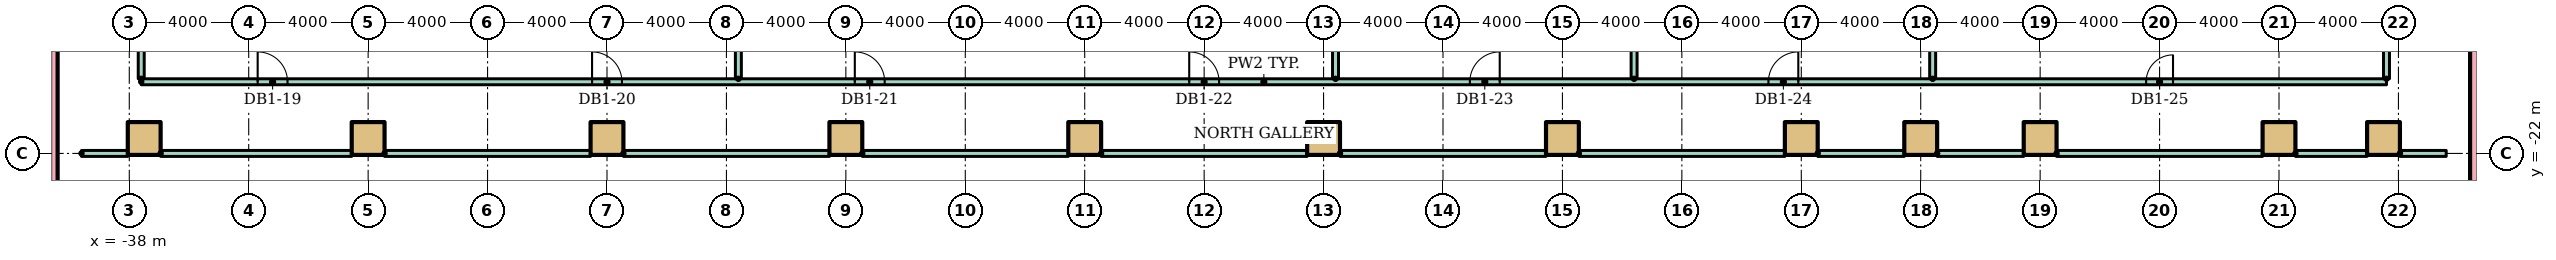
"""IFC4 building model, lengths in metres.
Left out: names, types, materials, properties, quantities, classifications, styles, units other than length and angle.
Written with IfcOpenShell. Run it as: python <this file> out.ifc"""

import sys

from ifc_helpers import new_model, si_unit, direction, frame, frame_2d, origin, origin_2d, place, context, subcontext, project, spatial, rectangle, extrude, element, fill, save


model = new_model("IFC4")
c1 = context("Model", 3, precision=1e-05, world=origin(), true_north=direction((0.0, 1.0)))
c2 = subcontext(c1, "Body", "Model", "MODEL_VIEW")
j1 = project(units=[si_unit("LENGTHUNIT", "METRE"), si_unit("PLANEANGLEUNIT", "RADIAN")], contexts=[c1])
p1 = place(None, origin())
s1 = spatial("IfcSite", under=j1, at=p1, CompositionType="ELEMENT")
p2 = place(p1, origin())
s2 = spatial("IfcBuilding", under=s1, at=p2, CompositionType="ELEMENT")
p3 = place(p2, frame((0.0, 0.0, -5.0)))
s3 = spatial("IfcBuildingStorey", under=s2, at=p3, CompositionType="ELEMENT", Elevation=-5.0)
for number, where, z_axis, x_axis in (
    (1, (-40.7, -50.4, -0.35), (0.0, 0.0, 1.0), (0.0, 1.0, 0.0)),
    (2, (40.7, -50.4, -0.35), (0.0, 0.0, 1.0), (0.0, 1.0, 0.0)),
):
    element("IfcWall", number, at=place(p3, frame(where, z_axis=z_axis, x_axis=x_axis)), inside=s3, PredefinedType="SOLIDWALL", context=c2, shape_type="SweptSolid", body=[
        extrude(rectangle(XDim=70.8, YDim=0.6, at=frame_2d((35.4, 0.0))), origin(), (0.0, 0.0, 1.0), 4.93),
    ])
for number, where in (
    (3, (-37.5, -21.5, 0.0)),
    (4, (-30.0, -21.5, 0.0)),
    (5, (-22.0, -21.5, 0.0)),
    (6, (-14.0, -21.5, 0.0)),
    (7, (-6.0, -21.5, 0.0)),
    (8, (2.0, -21.5, 0.0)),
    (9, (10.0, -21.5, 0.0)),
    (10, (18.0, -21.5, 0.0)),
    (11, (22.0, -21.5, 0.0)),
    (12, (26.0, -21.5, 0.0)),
    (13, (34.0, -21.5, 0.0)),
    (14, (37.5, -21.5, 0.0)),
):
    element("IfcColumn", number, at=place(p3, frame(where)), inside=s3, PredefinedType="COLUMN", context=c2, shape_type="SweptSolid", body=[
        extrude(rectangle(XDim=1.1, YDim=1.1, at=origin_2d()), origin(), (0.0, 0.0, 1.0), 5.0),
    ])
p4 = place(p3, frame((-39.6, -22.0, 0.0)))
e15 = element("IfcWall", 15, at=p4, inside=s3, PredefinedType="PARTITIONING", context=c2, shape_type="SweptSolid", body=[
    extrude(rectangle(XDim=1.55, YDim=0.2, at=frame_2d((0.775, 0.0))), origin(), (0.0, 0.0, 1.0), 4.58),
])
p5 = place(p3, frame((-36.95, -22.0, 0.0)))
e16 = element("IfcWall", 16, at=p5, inside=s3, PredefinedType="PARTITIONING", context=c2, shape_type="SweptSolid", body=[
    extrude(rectangle(XDim=6.4, YDim=0.2, at=frame_2d((3.2, 0.0))), origin(), (0.0, 0.0, 1.0), 4.58),
])
for number, where in (
    (17, (-29.45, -22.0, 0.0)),
    (18, (-21.45, -22.0, 0.0)),
    (19, (-13.45, -22.0, 0.0)),
    (20, (-5.45, -22.0, 0.0)),
    (21, (2.55, -22.0, 0.0)),
    (22, (10.55, -22.0, 0.0)),
):
    element("IfcWall", number, at=place(p3, frame(where)), inside=s3, PredefinedType="PARTITIONING", context=c2, shape_type="SweptSolid", body=[
        extrude(rectangle(XDim=6.9, YDim=0.2, at=frame_2d((3.45, 0.0))), origin(), (0.0, 0.0, 1.0), 4.58),
    ])
for number, where in (
    (23, (18.55, -22.0, 0.0)),
    (24, (22.55, -22.0, 0.0)),
):
    element("IfcWall", number, at=place(p3, frame(where)), inside=s3, PredefinedType="PARTITIONING", context=c2, shape_type="SweptSolid", body=[
        extrude(rectangle(XDim=2.9, YDim=0.2, at=frame_2d((1.45, 0.0))), origin(), (0.0, 0.0, 1.0), 4.58),
    ])
p6 = place(p3, frame((26.55, -22.0, 0.0)))
e25 = element("IfcWall", 25, at=p6, inside=s3, PredefinedType="PARTITIONING", context=c2, shape_type="SweptSolid", body=[
    extrude(rectangle(XDim=6.9, YDim=0.2, at=frame_2d((3.45, 0.0))), origin(), (0.0, 0.0, 1.0), 4.58),
])
p7 = place(p3, frame((34.55, -22.0, 0.0)))
e26 = element("IfcWall", 26, at=p7, inside=s3, PredefinedType="PARTITIONING", context=c2, shape_type="SweptSolid", body=[
    extrude(rectangle(XDim=2.4, YDim=0.2, at=frame_2d((1.2, 0.0))), origin(), (0.0, 0.0, 1.0), 4.58),
])
p8 = place(p3, frame((38.05, -22.0, 0.0)))
e27 = element("IfcWall", 27, at=p8, inside=s3, PredefinedType="PARTITIONING", context=c2, shape_type="SweptSolid", body=[
    extrude(rectangle(XDim=1.55, YDim=0.2, at=frame_2d((0.775, 0.0))), origin(), (0.0, 0.0, 1.0), 4.58),
])
p9 = place(p3, frame((-37.6, -19.6, 0.0)))
e28 = element("IfcWall", 28, at=p9, inside=s3, PredefinedType="PARTITIONING", context=c2, shape_type="SweptSolid", body=[
    extrude(rectangle(XDim=75.2, YDim=0.2, at=frame_2d((37.6, 0.0))), origin(), (0.0, 0.0, 1.0), 4.58),
])
p10 = place(p9, frame((3.9, 0.0, 0.0)))
e29 = element("IfcOpeningElement", 29, at=p10, cuts=e28, PredefinedType="OPENING", context=c2, shape_type="SweptSolid", body=[
    extrude(rectangle(XDim=1.0, YDim=2.1, at=frame_2d((0.5, 1.05))), frame((0.0, 0.11, 0.0), z_axis=(0.0, -1.0, 0.0), x_axis=(1.0, 0.0, 0.0)), (0.0, 0.0, 1.0), 0.22),
])
p11 = place(p9, frame((15.1, 0.0, 0.0)))
e30 = element("IfcOpeningElement", 30, at=p11, cuts=e28, PredefinedType="OPENING", context=c2, shape_type="SweptSolid", body=[
    extrude(rectangle(XDim=1.0, YDim=2.1, at=frame_2d((0.5, 1.05))), frame((0.0, 0.11, 0.0), z_axis=(0.0, -1.0, 0.0), x_axis=(1.0, 0.0, 0.0)), (0.0, 0.0, 1.0), 0.22),
])
p12 = place(p9, frame((23.9, 0.0, 0.0)))
e31 = element("IfcOpeningElement", 31, at=p12, cuts=e28, PredefinedType="OPENING", context=c2, shape_type="SweptSolid", body=[
    extrude(rectangle(XDim=1.0, YDim=2.1, at=frame_2d((0.5, 1.05))), frame((0.0, 0.11, 0.0), z_axis=(0.0, -1.0, 0.0), x_axis=(1.0, 0.0, 0.0)), (0.0, 0.0, 1.0), 0.22),
])
p13 = place(p9, frame((35.1, 0.0, 0.0)))
e32 = element("IfcOpeningElement", 32, at=p13, cuts=e28, PredefinedType="OPENING", context=c2, shape_type="SweptSolid", body=[
    extrude(rectangle(XDim=1.0, YDim=2.1, at=frame_2d((0.5, 1.05))), frame((0.0, 0.11, 0.0), z_axis=(0.0, -1.0, 0.0), x_axis=(1.0, 0.0, 0.0)), (0.0, 0.0, 1.0), 0.22),
])
p14 = place(p9, frame((44.5, 0.0, 0.0)))
e33 = element("IfcOpeningElement", 33, at=p14, cuts=e28, PredefinedType="OPENING", context=c2, shape_type="SweptSolid", body=[
    extrude(rectangle(XDim=1.0, YDim=2.1, at=frame_2d((0.5, 1.05))), frame((0.0, 0.11, 0.0), z_axis=(0.0, -1.0, 0.0), x_axis=(1.0, 0.0, 0.0)), (0.0, 0.0, 1.0), 0.22),
])
p15 = place(p9, frame((54.5, 0.0, 0.0)))
e34 = element("IfcOpeningElement", 34, at=p15, cuts=e28, PredefinedType="OPENING", context=c2, shape_type="SweptSolid", body=[
    extrude(rectangle(XDim=1.0, YDim=2.1, at=frame_2d((0.5, 1.05))), frame((0.0, 0.11, 0.0), z_axis=(0.0, -1.0, 0.0), x_axis=(1.0, 0.0, 0.0)), (0.0, 0.0, 1.0), 0.22),
])
p16 = place(p9, frame((67.15, 0.0, 0.0)))
e35 = element("IfcOpeningElement", 35, at=p16, cuts=e28, PredefinedType="OPENING", context=c2, shape_type="SweptSolid", body=[
    extrude(rectangle(XDim=0.9, YDim=2.1, at=frame_2d((0.45, 1.05))), frame((0.0, 0.11, 0.0), z_axis=(0.0, -1.0, 0.0), x_axis=(1.0, 0.0, 0.0)), (0.0, 0.0, 1.0), 0.22),
])
p17 = place(p3, frame((-37.6, -19.5, 0.0), z_axis=(0.0, 0.0, 1.0), x_axis=(0.0, 1.0, 0.0)))
e36 = element("IfcWall", 36, at=p17, inside=s3, PredefinedType="PARTITIONING", context=c2, shape_type="SweptSolid", body=[
    extrude(rectangle(XDim=6.2, YDim=0.2, at=frame_2d((3.1, 0.0))), origin(), (0.0, 0.0, 1.0), 4.58),
])
p18 = place(p3, frame((-17.6, -19.5, 0.0), z_axis=(0.0, 0.0, 1.0), x_axis=(0.0, 1.0, 0.0)))
e37 = element("IfcWall", 37, at=p18, inside=s3, PredefinedType="PARTITIONING", context=c2, shape_type="SweptSolid", body=[
    extrude(rectangle(XDim=10.65, YDim=0.2, at=frame_2d((5.325, 0.0))), origin(), (0.0, 0.0, 1.0), 4.58),
])
p19 = place(p3, frame((2.4, -19.5, 0.0), z_axis=(0.0, 0.0, 1.0), x_axis=(0.0, 1.0, 0.0)))
e38 = element("IfcWall", 38, at=p19, inside=s3, PredefinedType="PARTITIONING", context=c2, shape_type="SweptSolid", body=[
    extrude(rectangle(XDim=1.7, YDim=0.2, at=frame_2d((0.85, 0.0))), origin(), (0.0, 0.0, 1.0), 4.58),
])
for number, where, z_axis, x_axis in (
    (39, (12.4, -19.5, 0.0), (0.0, 0.0, 1.0), (0.0, 1.0, 0.0)),
    (40, (22.4, -19.5, 0.0), (0.0, 0.0, 1.0), (0.0, 1.0, 0.0)),
):
    element("IfcWall", number, at=place(p3, frame(where, z_axis=z_axis, x_axis=x_axis)), inside=s3, PredefinedType="PARTITIONING", context=c2, shape_type="SweptSolid", body=[
        extrude(rectangle(XDim=10.65, YDim=0.2, at=frame_2d((5.325, 0.0))), origin(), (0.0, 0.0, 1.0), 4.58),
    ])
p20 = place(p3, frame((37.6, -19.5, 0.0), z_axis=(0.0, 0.0, 1.0), x_axis=(0.0, 1.0, 0.0)))
e41 = element("IfcWall", 41, at=p20, inside=s3, PredefinedType="PARTITIONING", context=c2, shape_type="SweptSolid", body=[
    extrude(rectangle(XDim=6.2, YDim=0.2, at=frame_2d((3.1, 0.0))), origin(), (0.0, 0.0, 1.0), 4.58),
])
p21 = place(p10, origin())
e42 = element("IfcDoor", 42, at=p21, inside=s3, OperationType="SINGLE_SWING_LEFT", PredefinedType="DOOR", context=c2, shape_type="SweptSolid", body=[
    extrude(rectangle(XDim=1.0, YDim=2.1, at=frame_2d((0.5, 1.05))), frame((0.0, 0.025, 0.0), z_axis=(0.0, -1.0, 0.0), x_axis=(1.0, 0.0, 0.0)), (0.0, 0.0, 1.0), 0.05),
])
fill(e29, e42)
p22 = place(p11, origin())
e43 = element("IfcDoor", 43, at=p22, inside=s3, OperationType="SINGLE_SWING_LEFT", PredefinedType="DOOR", context=c2, shape_type="SweptSolid", body=[
    extrude(rectangle(XDim=1.0, YDim=2.1, at=frame_2d((0.5, 1.05))), frame((0.0, 0.025, 0.0), z_axis=(0.0, -1.0, 0.0), x_axis=(1.0, 0.0, 0.0)), (0.0, 0.0, 1.0), 0.05),
])
fill(e30, e43)
p23 = place(p12, origin())
e44 = element("IfcDoor", 44, at=p23, inside=s3, OperationType="SINGLE_SWING_LEFT", PredefinedType="DOOR", context=c2, shape_type="SweptSolid", body=[
    extrude(rectangle(XDim=1.0, YDim=2.1, at=frame_2d((0.5, 1.05))), frame((0.0, 0.025, 0.0), z_axis=(0.0, -1.0, 0.0), x_axis=(1.0, 0.0, 0.0)), (0.0, 0.0, 1.0), 0.05),
])
fill(e31, e44)
p24 = place(p13, origin())
e45 = element("IfcDoor", 45, at=p24, inside=s3, OperationType="SINGLE_SWING_LEFT", PredefinedType="DOOR", context=c2, shape_type="SweptSolid", body=[
    extrude(rectangle(XDim=1.0, YDim=2.1, at=frame_2d((0.5, 1.05))), frame((0.0, 0.025, 0.0), z_axis=(0.0, -1.0, 0.0), x_axis=(1.0, 0.0, 0.0)), (0.0, 0.0, 1.0), 0.05),
])
fill(e32, e45)
p25 = place(p14, origin())
e46 = element("IfcDoor", 46, at=p25, inside=s3, OperationType="SINGLE_SWING_RIGHT", PredefinedType="DOOR", context=c2, shape_type="SweptSolid", body=[
    extrude(rectangle(XDim=1.0, YDim=2.1, at=frame_2d((0.5, 1.05))), frame((0.0, 0.025, 0.0), z_axis=(0.0, -1.0, 0.0), x_axis=(1.0, 0.0, 0.0)), (0.0, 0.0, 1.0), 0.05),
])
fill(e33, e46)
p26 = place(p15, origin())
e47 = element("IfcDoor", 47, at=p26, inside=s3, OperationType="SINGLE_SWING_RIGHT", PredefinedType="DOOR", context=c2, shape_type="SweptSolid", body=[
    extrude(rectangle(XDim=1.0, YDim=2.1, at=frame_2d((0.5, 1.05))), frame((0.0, 0.025, 0.0), z_axis=(0.0, -1.0, 0.0), x_axis=(1.0, 0.0, 0.0)), (0.0, 0.0, 1.0), 0.05),
])
fill(e34, e47)
p27 = place(p16, origin())
e48 = element("IfcDoor", 48, at=p27, inside=s3, OperationType="SINGLE_SWING_RIGHT", PredefinedType="DOOR", context=c2, shape_type="SweptSolid", body=[
    extrude(rectangle(XDim=0.9, YDim=2.1, at=frame_2d((0.45, 1.05))), frame((0.0, 0.025, 0.0), z_axis=(0.0, -1.0, 0.0), x_axis=(1.0, 0.0, 0.0)), (0.0, 0.0, 1.0), 0.05),
])
fill(e35, e48)
save(model, sys.argv[1])
